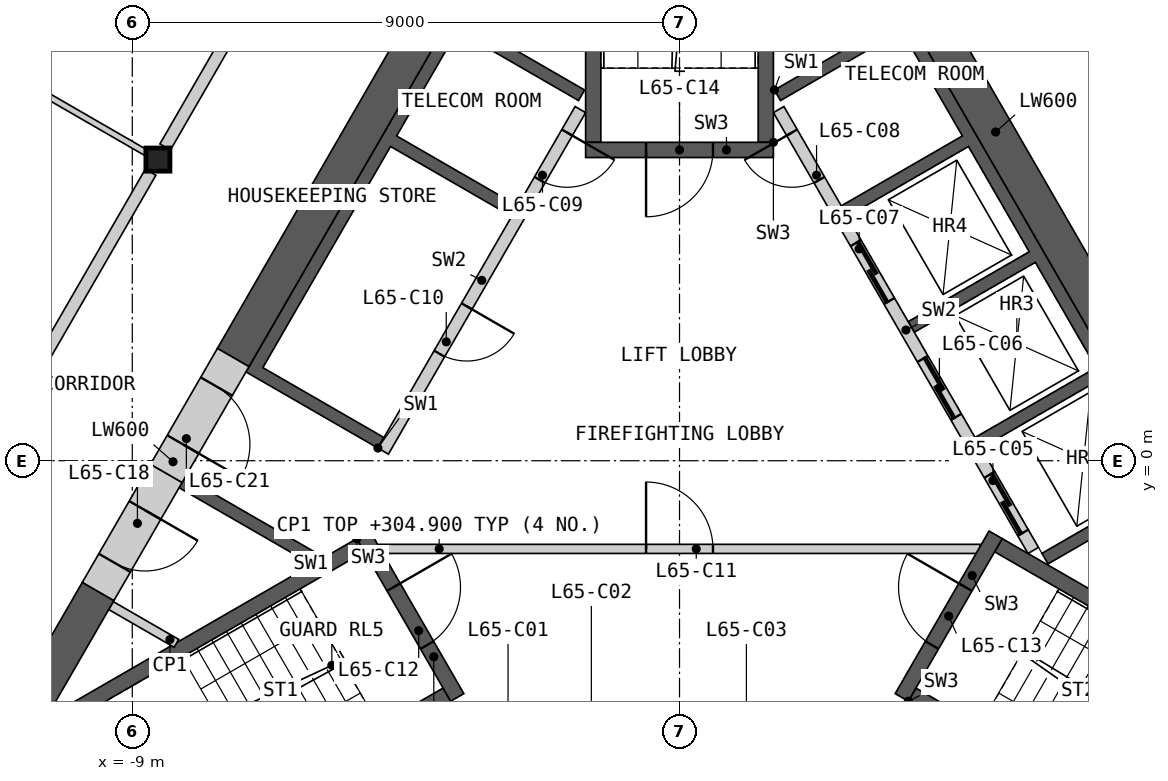
"""IFC4 building model, lengths in metres.
Left out: names, types, materials, properties, quantities, classifications, styles, units other than length and angle.
Written with IfcOpenShell. Run it as: python <this file> out.ifc"""

import sys

from ifc_helpers import new_model, si_unit, direction, frame, frame_2d, origin, origin_2d, place, context, subcontext, project, spatial, polyline, rectangle, i_section, outline, extrude, element, fill, save


model = new_model("IFC4")
c1 = context("Model", 3, precision=1e-05, world=origin(), true_north=direction((0.0, 1.0)))
c2 = subcontext(c1, "Body", "Model", "MODEL_VIEW")
j1 = project(units=[si_unit("LENGTHUNIT", "METRE"), si_unit("PLANEANGLEUNIT", "RADIAN")], contexts=[c1])
p1 = place(None, origin())
s1 = spatial("IfcSite", under=j1, at=p1, CompositionType="ELEMENT")
p2 = place(p1, origin())
s2 = spatial("IfcBuilding", under=s1, at=p2, CompositionType="ELEMENT")
p3 = place(p2, frame((0.0, 0.0, 301.8)))
s3 = spatial("IfcBuildingStorey", under=s2, at=p3, CompositionType="ELEMENT", Elevation=301.8)
p4 = place(p3, frame((-8.578, 4.953, 0.0), z_axis=(0.0, 0.0, 1.0), x_axis=(1.0, 0.0, 0.0)))
e1 = element("IfcColumn", 1, at=p4, inside=s3, PredefinedType="COLUMN", context=c2, shape_type="SweptSolid", body=[
    extrude(i_section(OverallWidth=0.396, OverallDepth=0.381, WebThickness=0.019, FlangeThickness=0.03, at=origin_2d()), origin(), (0.0, 0.0, 1.0), 3.4),
])
p5 = place(p3, origin())
e2 = element("IfcWall", 2, at=p5, inside=s3, PredefinedType="SHEAR", context=c2, shape_type="SweptSolid", body=[
    extrude(outline(polyline([(1.561, 6.097), (3.731, 7.35), (8.231, -0.444), (6.061, -1.697), (5.96, -1.524), (7.952, -0.374), (6.952, 1.358), (4.96, 0.208), (4.861, 0.381), (6.852, 1.531), (5.852, 3.263), (3.861, 2.113), (3.76, 2.287), (5.752, 3.437), (4.752, 5.169), (2.76, 4.019), (2.66, 4.192), (4.652, 5.342), (3.652, 7.074), (1.66, 5.924), (1.561, 6.097)])), origin(), (0.0, 0.0, 1.0), 3.1),
])
p6 = place(p3, frame((5.817, -1.476, 0.0), z_axis=(0.0, 0.0, 1.0), x_axis=(-0.500002616675, 0.866023893041, 0.0)))
e3 = element("IfcWall", 3, at=p6, inside=s3, PredefinedType="SOLIDWALL", context=c2, shape_type="SweptSolid", body=[
    extrude(rectangle(XDim=8.373, YDim=0.2, at=frame_2d((4.187, 0.0))), origin(), (0.0, 0.0, 1.0), 3.1),
])
p7 = place(p6, frame((0.337, 0.0, 0.0)))
e4 = element("IfcOpeningElement", 4, at=p7, cuts=e3, PredefinedType="OPENING", context=c2, shape_type="SweptSolid", body=[
    extrude(rectangle(XDim=1.1, YDim=2.1, at=frame_2d((0.55, 1.05))), frame((0.0, 0.11, 0.0), z_axis=(0.0, -1.0, 0.0), x_axis=(1.0, 0.0, 0.0)), (0.0, 0.0, 1.0), 0.22),
])
p8 = place(p6, frame((2.537, 0.0, 0.0)))
e5 = element("IfcOpeningElement", 5, at=p8, cuts=e3, PredefinedType="OPENING", context=c2, shape_type="SweptSolid", body=[
    extrude(rectangle(XDim=1.1, YDim=2.1, at=frame_2d((0.55, 1.05))), frame((0.0, 0.11, 0.0), z_axis=(0.0, -1.0, 0.0), x_axis=(1.0, 0.0, 0.0)), (0.0, 0.0, 1.0), 0.22),
])
p9 = place(p6, frame((4.737, 0.0, 0.0)))
e6 = element("IfcOpeningElement", 6, at=p9, cuts=e3, PredefinedType="OPENING", context=c2, shape_type="SweptSolid", body=[
    extrude(rectangle(XDim=1.1, YDim=2.1, at=frame_2d((0.55, 1.05))), frame((0.0, 0.11, 0.0), z_axis=(0.0, -1.0, 0.0), x_axis=(1.0, 0.0, 0.0)), (0.0, 0.0, 1.0), 0.22),
])
p10 = place(p6, frame((7.037, 0.0, 0.0)))
e7 = element("IfcOpeningElement", 7, at=p10, cuts=e3, PredefinedType="OPENING", context=c2, shape_type="SweptSolid", body=[
    extrude(rectangle(XDim=0.9, YDim=2.1, at=frame_2d((0.45, 1.05))), frame((0.0, 0.11, 0.0), z_axis=(0.0, -1.0, 0.0), x_axis=(1.0, 0.0, 0.0)), (0.0, 0.0, 1.0), 0.22),
])
p11 = place(p3, origin())
e8 = element("IfcWall", 8, at=p11, inside=s3, PredefinedType="SHEAR", context=c2, shape_type="SweptSolid", body=[
    extrude(outline(polyline([(-6.061, -1.697), (-8.231, -0.444), (-8.131, -0.271), (-5.96, -1.524), (-6.061, -1.697)])), origin(), (0.0, 0.0, 1.0), 3.1),
])
p12 = place(p3, origin())
e9 = element("IfcWall", 9, at=p12, inside=s3, PredefinedType="SHEAR", context=c2, shape_type="SweptSolid", body=[
    extrude(outline(polyline([(-4.96, 0.208), (-7.131, 1.461), (-3.731, 7.35), (-1.561, 6.097), (-1.66, 5.924), (-3.652, 7.074), (-4.652, 5.342), (-2.66, 4.192), (-2.76, 4.019), (-4.752, 5.169), (-6.852, 1.531), (-4.861, 0.381), (-4.96, 0.208)])), origin(), (0.0, 0.0, 1.0), 3.1),
])
p13 = place(p3, frame((-1.631, 5.776, 0.0), z_axis=(0.0, 0.0, 1.0), x_axis=(-0.499992876559, -0.866029516466, 0.0)))
e10 = element("IfcWall", 10, at=p13, inside=s3, PredefinedType="SOLIDWALL", context=c2, shape_type="SweptSolid", body=[
    extrude(rectangle(XDim=6.486, YDim=0.2, at=frame_2d((3.243, 0.0))), origin(), (0.0, 0.0, 1.0), 3.1),
])
p14 = place(p13, frame((0.437, 0.0, 0.0)))
e11 = element("IfcOpeningElement", 11, at=p14, cuts=e10, PredefinedType="OPENING", context=c2, shape_type="SweptSolid", body=[
    extrude(rectangle(XDim=0.9, YDim=2.1, at=frame_2d((0.45, 1.05))), frame((0.0, 0.11, 0.0), z_axis=(0.0, -1.0, 0.0), x_axis=(1.0, 0.0, 0.0)), (0.0, 0.0, 1.0), 0.22),
])
p15 = place(p13, frame((3.737, 0.0, 0.0)))
e12 = element("IfcOpeningElement", 12, at=p15, cuts=e10, PredefinedType="OPENING", context=c2, shape_type="SweptSolid", body=[
    extrude(rectangle(XDim=0.9, YDim=2.1, at=frame_2d((0.45, 1.05))), frame((0.0, 0.11, 0.0), z_axis=(0.0, -1.0, 0.0), x_axis=(1.0, 0.0, 0.0)), (0.0, 0.0, 1.0), 0.22),
])
p16 = place(p3, frame((-4.941, -1.45, 0.0), z_axis=(0.0, 0.0, 1.0), x_axis=(1.0, 0.0, 0.0)))
e13 = element("IfcWall", 13, at=p16, inside=s3, PredefinedType="PARTITIONING", context=c2, shape_type="SweptSolid", body=[
    extrude(rectangle(XDim=9.882, YDim=0.15, at=frame_2d((4.941, 0.0))), origin(), (0.0, 0.0, 1.0), 3.1),
])
p17 = place(p16, frame((4.391, 0.0, 0.0)))
e14 = element("IfcOpeningElement", 14, at=p17, cuts=e13, PredefinedType="OPENING", context=c2, shape_type="SweptSolid", body=[
    extrude(rectangle(XDim=1.1, YDim=2.1, at=frame_2d((0.55, 1.05))), frame((0.0, 0.085, 0.0), z_axis=(0.0, -1.0, 0.0), x_axis=(1.0, 0.0, 0.0)), (0.0, 0.0, 1.0), 0.17),
])
p18 = place(p3, origin())
e15 = element("IfcWall", 15, at=p18, inside=s3, PredefinedType="SHEAR", context=c2, shape_type="SweptSolid", body=[
    extrude(outline(polyline([(-5.307, -1.281), (-10.374, -4.206), (-10.032, -4.298), (-5.182, -1.498), (-5.307, -1.281)])), origin(), (0.0, 0.0, 1.0), 3.1),
])
p19 = place(p3, origin())
e16 = element("IfcWall", 16, at=p19, inside=s3, PredefinedType="SHEAR", context=c2, shape_type="SweptSolid", body=[
    extrude(outline(polyline([(-8.738, -6.539), (-8.83, -6.881), (-3.763, -3.956), (-3.888, -3.739), (-8.738, -6.539)])), origin(), (0.0, 0.0, 1.0), 3.1),
])
p20 = place(p3, frame((-5.199, -1.219, 0.0), z_axis=(0.0, 0.0, 1.0), x_axis=(0.499982516597, -0.866035497597, 0.0)))
e17 = element("IfcWall", 17, at=p20, inside=s3, PredefinedType="SHEAR", context=c2, shape_type="SweptSolid", body=[
    extrude(rectangle(XDim=3.088, YDim=0.25, at=frame_2d((1.544, 0.0))), origin(), (0.0, 0.0, 1.0), 3.1),
])
p21 = place(p20, frame((0.994, 0.0, 0.0)))
e18 = element("IfcOpeningElement", 18, at=p21, cuts=e17, PredefinedType="OPENING", context=c2, shape_type="SweptSolid", body=[
    extrude(rectangle(XDim=1.1, YDim=2.1, at=frame_2d((0.55, 1.05))), frame((0.0, 0.135, 0.0), z_axis=(0.0, -1.0, 0.0), x_axis=(1.0, 0.0, 0.0)), (0.0, 0.0, 1.0), 0.27),
])
p22 = place(p3, origin())
e19 = element("IfcWall", 19, at=p22, inside=s3, PredefinedType="SHEAR", context=c2, shape_type="SweptSolid", body=[
    extrude(outline(polyline([(3.763, -3.956), (8.83, -6.881), (8.738, -6.539), (3.888, -3.739), (3.763, -3.956)])), origin(), (0.0, 0.0, 1.0), 3.1),
])
p23 = place(p3, origin())
e20 = element("IfcWall", 20, at=p23, inside=s3, PredefinedType="SHEAR", context=c2, shape_type="SweptSolid", body=[
    extrude(outline(polyline([(10.032, -4.298), (10.374, -4.206), (5.307, -1.281), (5.182, -1.498), (10.032, -4.298)])), origin(), (0.0, 0.0, 1.0), 3.1),
])
p24 = place(p3, frame((3.655, -3.893, 0.0), z_axis=(0.0, 0.0, 1.0), x_axis=(0.499982516597, 0.866035497597, 0.0)))
e21 = element("IfcWall", 21, at=p24, inside=s3, PredefinedType="SHEAR", context=c2, shape_type="SweptSolid", body=[
    extrude(rectangle(XDim=3.088, YDim=0.25, at=frame_2d((1.544, 0.0))), origin(), (0.0, 0.0, 1.0), 3.1),
])
p25 = place(p24, frame((0.994, 0.0, 0.0)))
e22 = element("IfcOpeningElement", 22, at=p25, cuts=e21, PredefinedType="OPENING", context=c2, shape_type="SweptSolid", body=[
    extrude(rectangle(XDim=1.1, YDim=2.1, at=frame_2d((0.55, 1.05))), frame((0.0, 0.135, 0.0), z_axis=(0.0, -1.0, 0.0), x_axis=(1.0, 0.0, 0.0)), (0.0, 0.0, 1.0), 0.27),
])
p26 = place(p3, origin())
e23 = element("IfcWall", 23, at=p26, inside=s3, PredefinedType="SHEAR", context=c2, shape_type="SweptSolid", body=[
    extrude(outline(polyline([(1.544, 5.237), (1.544, 11.087), (1.294, 10.837), (1.294, 5.237), (1.544, 5.237)])), origin(), (0.0, 0.0, 1.0), 3.1),
])
p27 = place(p3, origin())
e24 = element("IfcWall", 24, at=p27, inside=s3, PredefinedType="SHEAR", context=c2, shape_type="SweptSolid", body=[
    extrude(outline(polyline([(-1.294, 10.837), (-1.544, 11.087), (-1.544, 5.237), (-1.294, 5.237), (-1.294, 10.837)])), origin(), (0.0, 0.0, 1.0), 3.1),
])
p28 = place(p3, frame((1.544, 5.112, 0.0), z_axis=(0.0, 0.0, 1.0), x_axis=(-1.0, 0.0, 0.0)))
e25 = element("IfcWall", 25, at=p28, inside=s3, PredefinedType="SHEAR", context=c2, shape_type="SweptSolid", body=[
    extrude(rectangle(XDim=3.088, YDim=0.25, at=frame_2d((1.544, 0.0))), origin(), (0.0, 0.0, 1.0), 3.1),
])
p29 = place(p28, frame((0.994, 0.0, 0.0)))
e26 = element("IfcOpeningElement", 26, at=p29, cuts=e25, PredefinedType="OPENING", context=c2, shape_type="SweptSolid", body=[
    extrude(rectangle(XDim=1.1, YDim=2.1, at=frame_2d((0.55, 1.05))), frame((0.0, 0.135, 0.0), z_axis=(0.0, -1.0, 0.0), x_axis=(1.0, 0.0, 0.0)), (0.0, 0.0, 1.0), 0.27),
])
p30 = place(p3, frame((-9.35, -2.383, 0.0), z_axis=(0.0, 0.0, 1.0), x_axis=(0.866057962423, -0.499943602543, 0.0)))
e27 = element("IfcWall", 27, at=p30, inside=s3, PredefinedType="PARTITIONING", context=c2, shape_type="SweptSolid", body=[
    extrude(rectangle(XDim=1.242, YDim=0.15, at=frame_2d((0.621, 0.0))), origin(), (0.0, 0.0, 1.0), 3.1),
])
p31 = place(p3, frame((8.841, -0.902, 0.0), z_axis=(0.0, 0.0, 1.0), x_axis=(-0.499995618375, 0.866027933502, 0.0)))
e28 = element("IfcWall", 28, at=p31, inside=s3, PredefinedType="SHEAR", context=c2, shape_type="SweptSolid", body=[
    extrude(rectangle(XDim=14.571, YDim=0.6, at=frame_2d((7.285, 0.0))), origin(), (0.0, 0.0, 1.0), 3.1),
])
p32 = place(p3, frame((-3.639, 8.107, 0.0), z_axis=(0.0, 0.0, 1.0), x_axis=(-0.49999180351, -0.866030135978, 0.0)))
e29 = element("IfcWall", 29, at=p32, inside=s3, PredefinedType="SHEAR", context=c2, shape_type="SweptSolid", body=[
    extrude(rectangle(XDim=7.401, YDim=0.6, at=frame_2d((3.701, 0.0))), origin(), (0.0, 0.0, 1.0), 3.1),
])
p33 = place(p3, frame((-9.562, -2.15, 0.0), z_axis=(0.0, 0.0, 1.0), x_axis=(-0.500015214976, -0.866016619236, 0.0)))
e30 = element("IfcWall", 30, at=p33, inside=s3, PredefinedType="SHEAR", context=c2, shape_type="SweptSolid", body=[
    extrude(rectangle(XDim=5.318, YDim=0.6, at=frame_2d((2.659, 0.0))), origin(), (0.0, 0.0, 1.0), 3.1),
])
p34 = place(p3, frame((-8.44, -0.208, 0.0), z_axis=(0.0, 0.0, 1.0), x_axis=(-0.500001951578, -0.866024277037, 0.0)))
e31 = element("IfcWall", 31, at=p34, inside=s3, PredefinedType="SHEAR", context=c2, shape_type="SweptSolid", body=[
    extrude(rectangle(XDim=2.243, YDim=0.6, at=frame_2d((1.122, 0.0))), origin(), (0.0, 0.0, 1.0), 3.1),
])
p35 = place(p34, frame((0.7, 0.0, 0.0)))
e32 = element("IfcOpeningElement", 32, at=p35, cuts=e31, PredefinedType="OPENING", context=c2, shape_type="SweptSolid", body=[
    extrude(rectangle(XDim=1.0, YDim=2.1, at=frame_2d((0.5, 1.05))), frame((0.0, 0.31, 0.0), z_axis=(0.0, -1.0, 0.0), x_axis=(1.0, 0.0, 0.0)), (0.0, 0.0, 1.0), 0.62),
])
p36 = place(p3, frame((-7.34, 1.698, 0.0), z_axis=(0.0, 0.0, 1.0), x_axis=(-0.50002983664, -0.866008176907, 0.0)))
e33 = element("IfcWall", 33, at=p36, inside=s3, PredefinedType="SHEAR", context=c2, shape_type="SweptSolid", body=[
    extrude(rectangle(XDim=2.2, YDim=0.6, at=frame_2d((1.1, 0.0))), origin(), (0.0, 0.0, 1.0), 3.1),
])
p37 = place(p36, frame((0.55, 0.0, 0.0)))
e34 = element("IfcOpeningElement", 34, at=p37, cuts=e33, PredefinedType="OPENING", context=c2, shape_type="SweptSolid", body=[
    extrude(rectangle(XDim=1.1, YDim=2.1, at=frame_2d((0.55, 1.05))), frame((0.0, 0.31, 0.0), z_axis=(0.0, -1.0, 0.0), x_axis=(1.0, 0.0, 0.0)), (0.0, 0.0, 1.0), 0.62),
])
p38 = place(p3, frame((4.409, 12.174, 0.0), z_axis=(0.0, 0.0, 1.0), x_axis=(0.499984266882, -0.866034487114, 0.0)))
e35 = element("IfcWall", 35, at=p38, inside=s3, PredefinedType="PARTITIONING", context=c2, shape_type="SweptSolid", body=[
    extrude(rectangle(XDim=8.099, YDim=0.2, at=frame_2d((4.049, 0.0))), origin(), (0.0, 0.0, 1.0), 3.1),
])
p39 = place(p38, frame((5.123, 0.0, 0.0)))
e36 = element("IfcOpeningElement", 36, at=p39, cuts=e35, PredefinedType="OPENING", context=c2, shape_type="SweptSolid", body=[
    extrude(rectangle(XDim=1.0, YDim=2.1, at=frame_2d((0.5, 1.05))), frame((0.0, 0.11, 0.0), z_axis=(0.0, -1.0, 0.0), x_axis=(1.0, 0.0, 0.0)), (0.0, 0.0, 1.0), 0.22),
])
p40 = place(p38, frame((1.164, 0.0, 0.0)))
e37 = element("IfcOpeningElement", 37, at=p40, cuts=e35, PredefinedType="OPENING", context=c2, shape_type="SweptSolid", body=[
    extrude(rectangle(XDim=1.0, YDim=2.1, at=frame_2d((0.5, 1.05))), frame((0.0, 0.11, 0.0), z_axis=(0.0, -1.0, 0.0), x_axis=(1.0, 0.0, 0.0)), (0.0, 0.0, 1.0), 0.22),
])
p41 = place(p3, frame((-8.458, 5.16, 0.0), z_axis=(0.0, 0.0, 1.0), x_axis=(0.499984266882, 0.866034487114, 0.0)))
e38 = element("IfcWall", 38, at=p41, inside=s3, PredefinedType="PARTITIONING", context=c2, shape_type="SweptSolid", body=[
    extrude(rectangle(XDim=8.099, YDim=0.2, at=frame_2d((4.049, 0.0))), origin(), (0.0, 0.0, 1.0), 3.1),
])
p42 = place(p41, frame((3.093, 0.0, 0.0)))
e39 = element("IfcOpeningElement", 39, at=p42, cuts=e38, PredefinedType="OPENING", context=c2, shape_type="SweptSolid", body=[
    extrude(rectangle(XDim=1.0, YDim=2.1, at=frame_2d((0.5, 1.05))), frame((0.0, 0.11, 0.0), z_axis=(0.0, -1.0, 0.0), x_axis=(1.0, 0.0, 0.0)), (0.0, 0.0, 1.0), 0.22),
])
p43 = place(p3, frame((-12.748, -2.269, 0.0), z_axis=(0.0, 0.0, 1.0), x_axis=(0.499984266882, 0.866034487114, 0.0)))
e40 = element("IfcWall", 40, at=p43, inside=s3, PredefinedType="PARTITIONING", context=c2, shape_type="SweptSolid", body=[
    extrude(rectangle(XDim=8.099, YDim=0.2, at=frame_2d((4.049, 0.0))), origin(), (0.0, 0.0, 1.0), 3.1),
])
p44 = place(p43, frame((1.164, 0.0, 0.0)))
e41 = element("IfcOpeningElement", 41, at=p44, cuts=e40, PredefinedType="OPENING", context=c2, shape_type="SweptSolid", body=[
    extrude(rectangle(XDim=1.0, YDim=2.1, at=frame_2d((0.5, 1.05))), frame((0.0, 0.11, 0.0), z_axis=(0.0, -1.0, 0.0), x_axis=(1.0, 0.0, 0.0)), (0.0, 0.0, 1.0), 0.22),
])
p45 = place(p3, frame((-16.054, 3.419, 0.0), z_axis=(0.0, 0.0, 1.0), x_axis=(0.499999256795, 0.866025832873, 0.0)))
e42 = element("IfcWall", 42, at=p45, inside=s3, PredefinedType="PARTITIONING", context=c2, shape_type="SweptSolid", body=[
    extrude(rectangle(XDim=15.448, YDim=0.1, at=frame_2d((7.724, 0.0))), origin(), (0.0, 0.0, 1.0), 2.33),
])
p46 = place(p45, frame((8.306, 0.0, 0.0)))
e43 = element("IfcOpeningElement", 43, at=p46, cuts=e42, PredefinedType="OPENING", context=c2, shape_type="SweptSolid", body=[
    extrude(rectangle(XDim=0.95, YDim=2.1, at=frame_2d((0.475, 1.05))), frame((0.0, 0.06, 0.0), z_axis=(0.0, -1.0, 0.0), x_axis=(1.0, 0.0, 0.0)), (0.0, 0.0, 1.0), 0.12),
])
p47 = place(p45, frame((1.76, 0.0, 0.0)))
e44 = element("IfcOpeningElement", 44, at=p47, cuts=e42, PredefinedType="OPENING", context=c2, shape_type="SweptSolid", body=[
    extrude(rectangle(XDim=0.95, YDim=2.1, at=frame_2d((0.475, 1.05))), frame((0.0, 0.06, 0.0), z_axis=(0.0, -1.0, 0.0), x_axis=(1.0, 0.0, 0.0)), (0.0, 0.0, 1.0), 0.12),
])
p48 = place(p3, frame((-19.615, 11.325, 0.0), z_axis=(0.0, 0.0, 1.0), x_axis=(0.86602139559, -0.500006942333, 0.0)))
e45 = element("IfcWall", 45, at=p48, inside=s3, PredefinedType="PARTITIONING", context=c2, shape_type="SweptSolid", body=[
    extrude(rectangle(XDim=12.505, YDim=0.1, at=frame_2d((6.252, 0.0))), origin(), (0.0, 0.0, 1.0), 2.33),
])
p49 = place(p48, frame((4.37, 0.0, 0.0)))
e46 = element("IfcOpeningElement", 46, at=p49, cuts=e45, PredefinedType="OPENING", context=c2, shape_type="SweptSolid", body=[
    extrude(rectangle(XDim=0.95, YDim=2.1, at=frame_2d((0.475, 1.05))), frame((0.0, 0.06, 0.0), z_axis=(0.0, -1.0, 0.0), x_axis=(1.0, 0.0, 0.0)), (0.0, 0.0, 1.0), 0.12),
])
p50 = place(p7, origin())
e47 = element("IfcDoor", 47, at=p50, inside=s3, OperationType="SLIDING_TO_LEFT", PredefinedType="DOOR", context=c2, shape_type="SweptSolid", body=[
    extrude(rectangle(XDim=1.1, YDim=2.1, at=frame_2d((0.55, 1.05))), frame((0.0, 0.025, 0.0), z_axis=(0.0, -1.0, 0.0), x_axis=(1.0, 0.0, 0.0)), (0.0, 0.0, 1.0), 0.05),
])
fill(e4, e47)
p51 = place(p8, origin())
e48 = element("IfcDoor", 48, at=p51, inside=s3, OperationType="SLIDING_TO_LEFT", PredefinedType="DOOR", context=c2, shape_type="SweptSolid", body=[
    extrude(rectangle(XDim=1.1, YDim=2.1, at=frame_2d((0.55, 1.05))), frame((0.0, 0.025, 0.0), z_axis=(0.0, -1.0, 0.0), x_axis=(1.0, 0.0, 0.0)), (0.0, 0.0, 1.0), 0.05),
])
fill(e5, e48)
p52 = place(p9, origin())
e49 = element("IfcDoor", 49, at=p52, inside=s3, OperationType="SLIDING_TO_LEFT", PredefinedType="DOOR", context=c2, shape_type="SweptSolid", body=[
    extrude(rectangle(XDim=1.1, YDim=2.1, at=frame_2d((0.55, 1.05))), frame((0.0, 0.025, 0.0), z_axis=(0.0, -1.0, 0.0), x_axis=(1.0, 0.0, 0.0)), (0.0, 0.0, 1.0), 0.05),
])
fill(e6, e49)
p53 = place(p10, origin())
e50 = element("IfcDoor", 50, at=p53, inside=s3, OperationType="SINGLE_SWING_RIGHT", PredefinedType="DOOR", context=c2, shape_type="SweptSolid", body=[
    extrude(rectangle(XDim=0.9, YDim=2.1, at=frame_2d((0.45, 1.05))), frame((0.0, 0.025, 0.0), z_axis=(0.0, -1.0, 0.0), x_axis=(1.0, 0.0, 0.0)), (0.0, 0.0, 1.0), 0.05),
])
fill(e7, e50)
p54 = place(p14, origin())
e51 = element("IfcDoor", 51, at=p54, inside=s3, OperationType="SINGLE_SWING_LEFT", PredefinedType="DOOR", context=c2, shape_type="SweptSolid", body=[
    extrude(rectangle(XDim=0.9, YDim=2.1, at=frame_2d((0.45, 1.05))), frame((0.0, 0.025, 0.0), z_axis=(0.0, -1.0, 0.0), x_axis=(1.0, 0.0, 0.0)), (0.0, 0.0, 1.0), 0.05),
])
fill(e11, e51)
p55 = place(p15, origin())
e52 = element("IfcDoor", 52, at=p55, inside=s3, OperationType="SINGLE_SWING_LEFT", PredefinedType="DOOR", context=c2, shape_type="SweptSolid", body=[
    extrude(rectangle(XDim=0.9, YDim=2.1, at=frame_2d((0.45, 1.05))), frame((0.0, 0.025, 0.0), z_axis=(0.0, -1.0, 0.0), x_axis=(1.0, 0.0, 0.0)), (0.0, 0.0, 1.0), 0.05),
])
fill(e12, e52)
p56 = place(p17, origin())
e53 = element("IfcDoor", 53, at=p56, inside=s3, OperationType="SINGLE_SWING_LEFT", PredefinedType="DOOR", context=c2, shape_type="SweptSolid", body=[
    extrude(rectangle(XDim=1.1, YDim=2.1, at=frame_2d((0.55, 1.05))), frame((0.0, 0.025, 0.0), z_axis=(0.0, -1.0, 0.0), x_axis=(1.0, 0.0, 0.0)), (0.0, 0.0, 1.0), 0.05),
])
fill(e14, e53)
p57 = place(p21, origin())
e54 = element("IfcDoor", 54, at=p57, inside=s3, OperationType="SINGLE_SWING_LEFT", PredefinedType="DOOR", context=c2, shape_type="SweptSolid", body=[
    extrude(rectangle(XDim=1.1, YDim=2.1, at=frame_2d((0.55, 1.05))), frame((0.0, 0.025, 0.0), z_axis=(0.0, -1.0, 0.0), x_axis=(1.0, 0.0, 0.0)), (0.0, 0.0, 1.0), 0.05),
])
fill(e18, e54)
p58 = place(p25, origin())
e55 = element("IfcDoor", 55, at=p58, inside=s3, OperationType="SINGLE_SWING_RIGHT", PredefinedType="DOOR", context=c2, shape_type="SweptSolid", body=[
    extrude(rectangle(XDim=1.1, YDim=2.1, at=frame_2d((0.55, 1.05))), frame((0.0, 0.025, 0.0), z_axis=(0.0, -1.0, 0.0), x_axis=(1.0, 0.0, 0.0)), (0.0, 0.0, 1.0), 0.05),
])
fill(e22, e55)
p59 = place(p29, origin())
e56 = element("IfcDoor", 56, at=p59, inside=s3, OperationType="SINGLE_SWING_RIGHT", PredefinedType="DOOR", context=c2, shape_type="SweptSolid", body=[
    extrude(rectangle(XDim=1.1, YDim=2.1, at=frame_2d((0.55, 1.05))), frame((0.0, 0.025, 0.0), z_axis=(0.0, -1.0, 0.0), x_axis=(1.0, 0.0, 0.0)), (0.0, 0.0, 1.0), 0.05),
])
fill(e26, e56)
p60 = place(p35, origin())
e57 = element("IfcDoor", 57, at=p60, inside=s3, OperationType="SINGLE_SWING_LEFT", PredefinedType="DOOR", context=c2, shape_type="SweptSolid", body=[
    extrude(rectangle(XDim=1.0, YDim=2.1, at=frame_2d((0.5, 1.05))), frame((0.0, 0.055, 0.0), z_axis=(0.0, -1.0, 0.0), x_axis=(1.0, 0.0, 0.0)), (0.0, 0.0, 1.0), 0.05),
])
fill(e32, e57)
p61 = place(p37, origin())
e58 = element("IfcDoor", 58, at=p61, inside=s3, OperationType="SINGLE_SWING_RIGHT", PredefinedType="DOOR", context=c2, shape_type="SweptSolid", body=[
    extrude(rectangle(XDim=1.1, YDim=2.1, at=frame_2d((0.55, 1.05))), frame((0.0, 0.055, 0.0), z_axis=(0.0, -1.0, 0.0), x_axis=(1.0, 0.0, 0.0)), (0.0, 0.0, 1.0), 0.05),
])
fill(e34, e58)
save(model, sys.argv[1])
